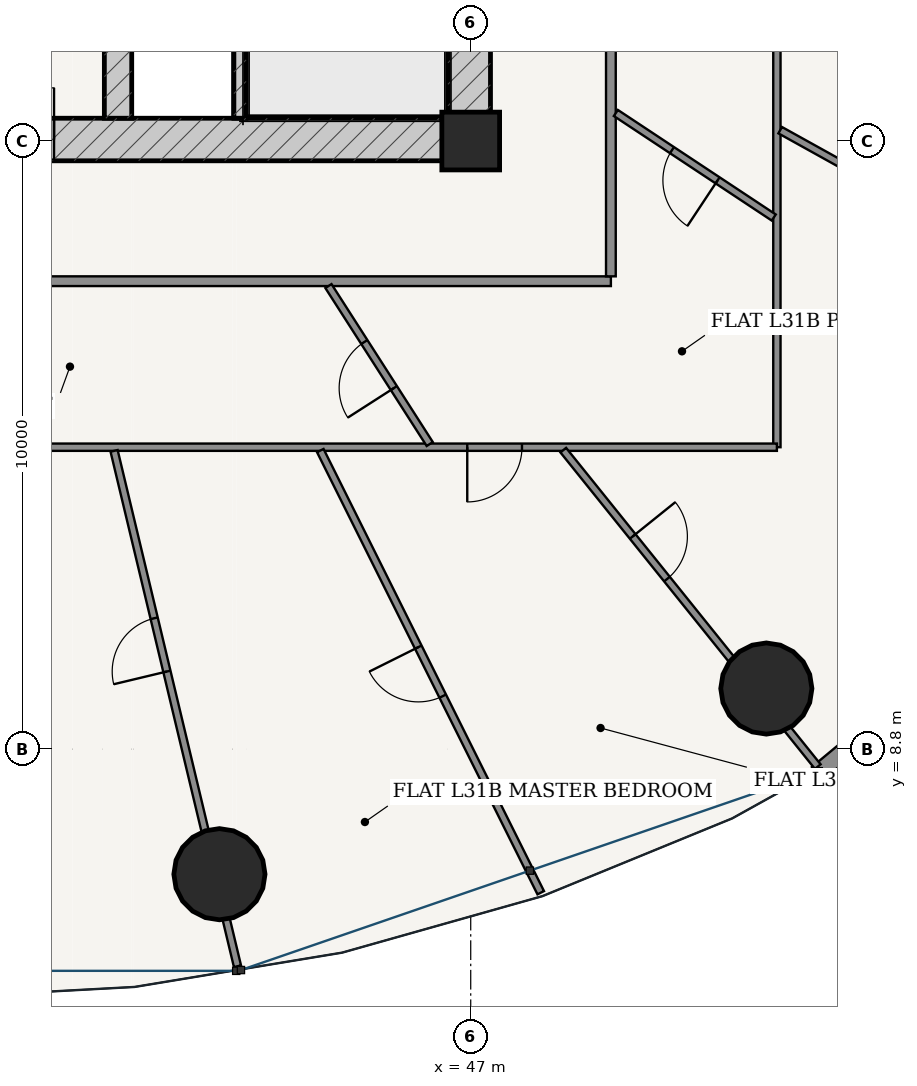
"""IFC4 building model, lengths in metres.
Left out: names, types, materials, properties, quantities, classifications, styles, units other than length and angle.
Written with IfcOpenShell. Run it as: python <this file> out.ifc"""

import sys

from ifc_helpers import new_model, si_unit, direction, frame, frame_2d, origin, origin_2d, place, context, subcontext, project, spatial, rectangle, hollow_circle, extrude, source, transform, mapped, element, fill, save


model = new_model("IFC4")
c1 = context("Model", 3, precision=1e-05, world=origin(), true_north=direction((-0.2419218956, 0.970295726276)))
c2 = subcontext(c1, "Body", "Model", "MODEL_VIEW")
j1 = project(units=[si_unit("LENGTHUNIT", "METRE"), si_unit("PLANEANGLEUNIT", "RADIAN")], contexts=[c1])
p1 = place(None, origin())
s1 = spatial("IfcSite", under=j1, at=p1, CompositionType="ELEMENT")
p2 = place(p1, origin())
s2 = spatial("IfcBuilding", under=s1, at=p2, CompositionType="ELEMENT")
p3 = place(p2, frame((0.0, 0.0, 119.4)))
s3 = spatial("IfcBuildingStorey", under=s2, at=p3, CompositionType="ELEMENT", Elevation=119.4)
p4 = place(p3, frame((47.0, 18.8, 0.0), z_axis=(0.0, 0.0, 1.0), x_axis=(1.0, 0.0, 0.0)))
e1 = element("IfcColumn", 1, at=p4, inside=s3, PredefinedType="COLUMN", context=c2, shape_type="SweptSolid", body=[
    extrude(rectangle(XDim=0.95, YDim=0.95, at=origin_2d()), origin(), (0.0, 0.0, 1.0), 3.6),
])
p5 = place(p3, frame((28.675, 18.825, 0.0), z_axis=(0.0, 0.0, 1.0), x_axis=(1.0, 0.0, 0.0)))
e2 = element("IfcWall", 2, at=p5, inside=s3, PredefinedType="SHEAR", context=c2, shape_type="SweptSolid", body=[
    extrude(rectangle(XDim=18.65, YDim=0.7, at=frame_2d((9.325, 0.0))), origin(), (0.0, 0.0, 1.0), 3.325),
])
p6 = place(p5, frame((7.577, 0.0, 0.0)))
e3 = element("IfcOpeningElement", 3, at=p6, cuts=e2, PredefinedType="OPENING", context=c2, shape_type="SweptSolid", body=[
    extrude(rectangle(XDim=0.85, YDim=2.1, at=frame_2d((0.425, 1.05))), frame((0.0, 0.36, 0.0), z_axis=(0.0, -1.0, 0.0), x_axis=(1.0, 0.0, 0.0)), (0.0, 0.0, 1.0), 0.72),
])
p7 = place(p5, frame((10.623, 0.0, 0.0)))
e4 = element("IfcOpeningElement", 4, at=p7, cuts=e2, PredefinedType="OPENING", context=c2, shape_type="SweptSolid", body=[
    extrude(rectangle(XDim=0.85, YDim=2.1, at=frame_2d((0.425, 1.05))), frame((0.0, 0.36, 0.0), z_axis=(0.0, -1.0, 0.0), x_axis=(1.0, 0.0, 0.0)), (0.0, 0.0, 1.0), 0.72),
])
p8 = place(p3, frame((46.975, 19.175, 0.0), z_axis=(0.0, 0.0, 1.0), x_axis=(0.0, 1.0, 0.0)))
e5 = element("IfcWall", 5, at=p8, inside=s3, PredefinedType="SHEAR", context=c2, shape_type="SweptSolid", body=[
    extrude(rectangle(XDim=15.25, YDim=0.7, at=frame_2d((7.625, 0.0))), origin(), (0.0, 0.0, 1.0), 3.325),
])
p9 = place(p8, frame((9.875, 0.0, 0.0)))
e6 = element("IfcOpeningElement", 6, at=p9, cuts=e5, PredefinedType="OPENING", context=c2, shape_type="SweptSolid", body=[
    extrude(rectangle(XDim=1.5, YDim=2.2, at=frame_2d((0.75, 1.1))), frame((0.0, 0.36, 0.0), z_axis=(0.0, -1.0, 0.0), x_axis=(1.0, 0.0, 0.0)), (0.0, 0.0, 1.0), 0.72),
])
p10 = place(p3, frame((43.205, 19.175, 0.0), z_axis=(0.0, 0.0, 1.0), x_axis=(0.0, 1.0, 0.0)))
e7 = element("IfcWall", 7, at=p10, inside=s3, PredefinedType="SOLIDWALL", context=c2, shape_type="SweptSolid", body=[
    extrude(rectangle(XDim=7.375, YDim=0.2, at=frame_2d((3.688, 0.0))), origin(), (0.0, 0.0, 1.0), 3.325),
])
p11 = place(p3, frame((41.2, 19.175, 0.0), z_axis=(0.0, 0.0, 1.0), x_axis=(0.0, 1.0, 0.0)))
e8 = element("IfcWall", 8, at=p11, inside=s3, PredefinedType="SHEAR", context=c2, shape_type="SweptSolid", body=[
    extrude(rectangle(XDim=15.25, YDim=0.45, at=frame_2d((7.625, 0.0))), origin(), (0.0, 0.0, 1.0), 3.325),
])
p12 = place(p11, frame((7.8, 0.0, 0.0)))
e9 = element("IfcOpeningElement", 9, at=p12, cuts=e8, PredefinedType="OPENING", context=c2, shape_type="SweptSolid", body=[
    extrude(rectangle(XDim=1.05, YDim=2.15, at=frame_2d((0.525, 1.075))), frame((0.0, 0.235, 0.0), z_axis=(0.0, -1.0, 0.0), x_axis=(1.0, 0.0, 0.0)), (0.0, 0.0, 1.0), 0.47),
])
for number, where, z_axis, x_axis in (
    (10, (42.867, 6.743, 0.0), (0.0, 0.0, 1.0), (1.0, 0.0, 0.0)),
    (11, (51.862, 9.796, 0.0), (0.0, 0.0, 1.0), (1.0, 0.0, 0.0)),
):
    element("IfcColumn", number, at=place(p3, frame(where, z_axis=z_axis, x_axis=x_axis)), inside=s3, PredefinedType="COLUMN", context=c2, shape_type="SweptSolid", body=[
        extrude(hollow_circle(Radius=0.75, WallThickness=0.045, at=origin_2d()), origin(), (0.0, 0.0, 1.0), 3.6),
    ])
p13 = place(p3, frame((52.7, 8.398, 0.0), z_axis=(0.0, 0.0, 1.0), x_axis=(0.769254958887, 0.638941944333, 0.0)))
e12 = element("IfcWall", 12, at=p13, inside=s3, PredefinedType="SOLIDWALL", context=c2, shape_type="SweptSolid", body=[
    extrude(rectangle(XDim=9.69, YDim=0.28, at=frame_2d((4.845, 0.0))), origin(), (0.0, 0.0, 1.0), 3.325),
])
p14 = place(p13, frame((1.566, 0.0, 0.85)))
e13 = element("IfcOpeningElement", 13, at=p14, cuts=e12, PredefinedType="OPENING", context=c2, shape_type="SweptSolid", body=[
    extrude(rectangle(XDim=2.1, YDim=1.95, at=frame_2d((1.05, 0.975))), frame((0.0, 0.15, 0.0), z_axis=(0.0, -1.0, 0.0), x_axis=(1.0, 0.0, 0.0)), (0.0, 0.0, 1.0), 0.3),
])
p15 = place(p13, frame((6.023, 0.0, 0.85)))
e14 = element("IfcOpeningElement", 14, at=p15, cuts=e12, PredefinedType="OPENING", context=c2, shape_type="SweptSolid", body=[
    extrude(rectangle(XDim=2.1, YDim=1.95, at=frame_2d((1.05, 0.975))), frame((0.0, 0.15, 0.0), z_axis=(0.0, -1.0, 0.0), x_axis=(1.0, 0.0, 0.0)), (0.0, 0.0, 1.0), 0.3),
])
p16 = place(p3, frame((26.695, 16.495, 0.0), z_axis=(0.0, 0.0, 1.0), x_axis=(1.0, 0.0, 0.0)))
e15 = element("IfcWall", 15, at=p16, inside=s3, PredefinedType="PARTITIONING", context=c2, shape_type="SweptSolid", body=[
    extrude(rectangle(XDim=22.61, YDim=0.16, at=frame_2d((11.305, 0.0))), origin(), (0.0, 0.0, 1.0), 2.767),
])
p17 = place(p3, frame((49.305, 16.575, 0.0), z_axis=(0.0, 0.0, 1.0), x_axis=(0.0, 1.0, 0.0)))
e16 = element("IfcWall", 16, at=p17, inside=s3, PredefinedType="PARTITIONING", context=c2, shape_type="SweptSolid", body=[
    extrude(rectangle(XDim=20.45, YDim=0.16, at=frame_2d((10.225, 0.0))), origin(), (0.0, 0.0, 1.0), 2.767),
])
p18 = place(p17, frame((17.046, 0.0, 0.0)))
e17 = element("IfcOpeningElement", 17, at=p18, cuts=e16, PredefinedType="OPENING", context=c2, shape_type="SweptSolid", body=[
    extrude(rectangle(XDim=0.98, YDim=2.2, at=frame_2d((0.49, 1.1))), frame((0.0, 0.09, 0.0), z_axis=(0.0, -1.0, 0.0), x_axis=(1.0, 0.0, 0.0)), (0.0, 0.0, 1.0), 0.18),
])
p19 = place(p3, frame((52.035, 39.835, 0.0), z_axis=(0.0, 0.0, 1.0), x_axis=(0.0, -1.0, 0.0)))
e18 = element("IfcWall", 18, at=p19, inside=s3, PredefinedType="PARTITIONING", context=c2, shape_type="SweptSolid", body=[
    extrude(rectangle(XDim=26.07, YDim=0.12, at=frame_2d((13.035, 0.0))), origin(), (0.0, 0.0, 1.0), 2.767),
])
p20 = place(p19, frame((3.362, 0.0, 0.0)))
e19 = element("IfcOpeningElement", 19, at=p20, cuts=e18, PredefinedType="OPENING", context=c2, shape_type="SweptSolid", body=[
    extrude(rectangle(XDim=0.9, YDim=2.15, at=frame_2d((0.45, 1.075))), frame((0.0, 0.07, 0.0), z_axis=(0.0, -1.0, 0.0), x_axis=(1.0, 0.0, 0.0)), (0.0, 0.0, 1.0), 0.14),
])
p21 = place(p19, frame((13.924, 0.0, 0.0)))
e20 = element("IfcOpeningElement", 20, at=p21, cuts=e18, PredefinedType="OPENING", context=c2, shape_type="SweptSolid", body=[
    extrude(rectangle(XDim=0.9, YDim=2.15, at=frame_2d((0.45, 1.075))), frame((0.0, 0.07, 0.0), z_axis=(0.0, -1.0, 0.0), x_axis=(1.0, 0.0, 0.0)), (0.0, 0.0, 1.0), 0.14),
])
p22 = place(p3, frame((52.035, 13.765, 0.0), z_axis=(0.0, 0.0, 1.0), x_axis=(-1.0, 0.0, 0.0)))
e21 = element("IfcWall", 21, at=p22, inside=s3, PredefinedType="PARTITIONING", context=c2, shape_type="SweptSolid", body=[
    extrude(rectangle(XDim=24.416, YDim=0.12, at=frame_2d((12.208, 0.0))), origin(), (0.0, 0.0, 1.0), 2.767),
])
p23 = place(p22, frame((4.192, 0.0, 0.0)))
e22 = element("IfcOpeningElement", 22, at=p23, cuts=e21, PredefinedType="OPENING", context=c2, shape_type="SweptSolid", body=[
    extrude(rectangle(XDim=0.9, YDim=2.15, at=frame_2d((0.45, 1.075))), frame((0.0, 0.07, 0.0), z_axis=(0.0, -1.0, 0.0), x_axis=(1.0, 0.0, 0.0)), (0.0, 0.0, 1.0), 0.14),
])
p24 = place(p22, frame((19.728, 0.0, 0.0)))
e23 = element("IfcOpeningElement", 23, at=p24, cuts=e21, PredefinedType="OPENING", context=c2, shape_type="SweptSolid", body=[
    extrude(rectangle(XDim=0.86, YDim=2.15, at=frame_2d((0.43, 1.075))), frame((0.0, 0.07, 0.0), z_axis=(0.0, -1.0, 0.0), x_axis=(1.0, 0.0, 0.0)), (0.0, 0.0, 1.0), 0.14),
])
p25 = place(p3, frame((41.135, 13.705, 0.0), z_axis=(0.0, 0.0, 1.0), x_axis=(0.23282725047, -0.97251810854, 0.0)))
e24 = element("IfcWall", 24, at=p25, inside=s3, PredefinedType="PARTITIONING", context=c2, shape_type="SweptSolid", body=[
    extrude(rectangle(XDim=8.715, YDim=0.12, at=frame_2d((4.357, 0.0))), origin(), (0.0, 0.0, 1.0), 2.767),
])
p26 = place(p25, frame((2.831, 0.0, 0.0)))
e25 = element("IfcOpeningElement", 25, at=p26, cuts=e24, PredefinedType="OPENING", context=c2, shape_type="SweptSolid", body=[
    extrude(rectangle(XDim=0.9, YDim=2.15, at=frame_2d((0.45, 1.075))), frame((0.0, 0.07, 0.0), z_axis=(0.0, -1.0, 0.0), x_axis=(1.0, 0.0, 0.0)), (0.0, 0.0, 1.0), 0.14),
])
p27 = place(p3, frame((44.526, 13.709, 0.0), z_axis=(0.0, 0.0, 1.0), x_axis=(0.446179583353, -0.894943450392, 0.0)))
e26 = element("IfcWall", 26, at=p27, inside=s3, PredefinedType="PARTITIONING", context=c2, shape_type="SweptSolid", body=[
    extrude(rectangle(XDim=8.125, YDim=0.12, at=frame_2d((4.062, 0.0))), origin(), (0.0, 0.0, 1.0), 2.767),
])
p28 = place(p27, frame((3.612, 0.0, 0.0)))
e27 = element("IfcOpeningElement", 27, at=p28, cuts=e26, PredefinedType="OPENING", context=c2, shape_type="SweptSolid", body=[
    extrude(rectangle(XDim=0.9, YDim=2.15, at=frame_2d((0.45, 1.075))), frame((0.0, 0.07, 0.0), z_axis=(0.0, -1.0, 0.0), x_axis=(1.0, 0.0, 0.0)), (0.0, 0.0, 1.0), 0.14),
])
p29 = place(p3, frame((48.522, 13.717, 0.0), z_axis=(0.0, 0.0, 1.0), x_axis=(0.626707979732, -0.77925419995, 0.0)))
e28 = element("IfcWall", 28, at=p29, inside=s3, PredefinedType="PARTITIONING", context=c2, shape_type="SweptSolid", body=[
    extrude(rectangle(XDim=6.679, YDim=0.12, at=frame_2d((3.339, 0.0))), origin(), (0.0, 0.0, 1.0), 2.767),
])
p30 = place(p29, frame((1.821, 0.0, 0.0)))
e29 = element("IfcOpeningElement", 29, at=p30, cuts=e28, PredefinedType="OPENING", context=c2, shape_type="SweptSolid", body=[
    extrude(rectangle(XDim=0.9, YDim=2.15, at=frame_2d((0.45, 1.075))), frame((0.0, 0.07, 0.0), z_axis=(0.0, -1.0, 0.0), x_axis=(1.0, 0.0, 0.0)), (0.0, 0.0, 1.0), 0.14),
])
p31 = place(p3, frame((52.089, 18.979, 0.0), z_axis=(0.0, 0.0, 1.0), x_axis=(0.874313476423, -0.485361664066, 0.0)))
e30 = element("IfcWall", 30, at=p31, inside=s3, PredefinedType="PARTITIONING", context=c2, shape_type="SweptSolid", body=[
    extrude(rectangle(XDim=9.066, YDim=0.12, at=frame_2d((4.533, 0.0))), origin(), (0.0, 0.0, 1.0), 2.767),
])
p32 = place(p3, frame((52.094, 21.95, 0.0), z_axis=(0.0, 0.0, 1.0), x_axis=(0.945573120726, -0.32540970078, 0.0)))
e31 = element("IfcWall", 31, at=p32, inside=s3, PredefinedType="PARTITIONING", context=c2, shape_type="SweptSolid", body=[
    extrude(rectangle(XDim=11.022, YDim=0.12, at=frame_2d((5.511, 0.0))), origin(), (0.0, 0.0, 1.0), 2.767),
])
p33 = place(p32, frame((5.061, 0.0, 0.0)))
e32 = element("IfcOpeningElement", 32, at=p33, cuts=e31, PredefinedType="OPENING", context=c2, shape_type="SweptSolid", body=[
    extrude(rectangle(XDim=0.9, YDim=2.15, at=frame_2d((0.45, 1.075))), frame((0.0, 0.07, 0.0), z_axis=(0.0, -1.0, 0.0), x_axis=(1.0, 0.0, 0.0)), (0.0, 0.0, 1.0), 0.14),
])
p34 = place(p3, frame((44.66, 16.415, 0.0), z_axis=(0.0, 0.0, 1.0), x_axis=(0.539825682796, -0.841776830397, 0.0)))
e33 = element("IfcWall", 33, at=p34, inside=s3, PredefinedType="PARTITIONING", context=c2, shape_type="SweptSolid", body=[
    extrude(rectangle(XDim=3.086, YDim=0.12, at=frame_2d((1.543, 0.0))), origin(), (0.0, 0.0, 1.0), 3.325),
])
p35 = place(p34, frame((1.093, 0.0, 0.0)))
e34 = element("IfcOpeningElement", 34, at=p35, cuts=e33, PredefinedType="OPENING", context=c2, shape_type="SweptSolid", body=[
    extrude(rectangle(XDim=0.9, YDim=2.15, at=frame_2d((0.45, 1.075))), frame((0.0, 0.07, 0.0), z_axis=(0.0, -1.0, 0.0), x_axis=(1.0, 0.0, 0.0)), (0.0, 0.0, 1.0), 0.14),
])
p36 = place(p3, frame((49.387, 19.261, 0.0), z_axis=(0.0, 0.0, 1.0), x_axis=(0.833806969544, -0.552056099993, 0.0)))
e35 = element("IfcWall", 35, at=p36, inside=s3, PredefinedType="PARTITIONING", context=c2, shape_type="SweptSolid", body=[
    extrude(rectangle(XDim=3.114, YDim=0.12, at=frame_2d((1.557, 0.0))), origin(), (0.0, 0.0, 1.0), 3.325),
])
p37 = place(p36, frame((1.107, 0.0, 0.0)))
e36 = element("IfcOpeningElement", 36, at=p37, cuts=e35, PredefinedType="OPENING", context=c2, shape_type="SweptSolid", body=[
    extrude(rectangle(XDim=0.9, YDim=2.15, at=frame_2d((0.45, 1.075))), frame((0.0, 0.07, 0.0), z_axis=(0.0, -1.0, 0.0), x_axis=(1.0, 0.0, 0.0)), (0.0, 0.0, 1.0), 0.14),
])
m1 = source(origin(), c2, "Body", "SweptSolid", [
    extrude(rectangle(XDim=0.85, YDim=2.1, at=frame_2d((0.425, 1.05))), frame((0.0, 0.025, 0.0), z_axis=(0.0, -1.0, 0.0), x_axis=(1.0, 0.0, 0.0)), (0.0, 0.0, 1.0), 0.05),
])
p38 = place(p7, origin())
e37 = element("IfcDoor", 37, at=p38, inside=s3, OperationType="SINGLE_SWING_RIGHT", PredefinedType="DOOR", context=c2, shape_type="MappedRepresentation", body=[
    mapped(m1, transform((0.0, 0.0, 0.0), scale=1.0)),
])
fill(e4, e37)
m2 = source(origin(), c2, "Body", "SweptSolid", [
    extrude(rectangle(XDim=0.9, YDim=2.15, at=frame_2d((0.45, 1.075))), frame((0.0, 0.025, 0.0), z_axis=(0.0, -1.0, 0.0), x_axis=(1.0, 0.0, 0.0)), (0.0, 0.0, 1.0), 0.05),
])
p39 = place(p37, frame((0.9, 0.0, 0.0), z_axis=(0.0, 0.0, 1.0), x_axis=(-1.0, 0.0, 0.0)))
e38 = element("IfcDoor", 38, at=p39, inside=s3, OperationType="SINGLE_SWING_LEFT", PredefinedType="DOOR", context=c2, shape_type="MappedRepresentation", body=[
    mapped(m2, transform((0.0, 0.0, 0.0), scale=1.0)),
])
fill(e36, e38)
p40 = place(p23, origin())
e39 = element("IfcDoor", 39, at=p40, inside=s3, OperationType="SINGLE_SWING_RIGHT", PredefinedType="DOOR", context=c2, shape_type="MappedRepresentation", body=[
    mapped(m2, transform((0.0, 0.0, 0.0), scale=1.0)),
])
fill(e22, e39)
p41 = place(p30, origin())
e40 = element("IfcDoor", 40, at=p41, inside=s3, OperationType="SINGLE_SWING_LEFT", PredefinedType="DOOR", context=c2, shape_type="MappedRepresentation", body=[
    mapped(m2, transform((0.0, 0.0, 0.0), scale=1.0)),
])
fill(e29, e40)
p42 = place(p35, frame((0.9, 0.0, 0.0), z_axis=(0.0, 0.0, 1.0), x_axis=(-1.0, 0.0, 0.0)))
e41 = element("IfcDoor", 41, at=p42, inside=s3, OperationType="SINGLE_SWING_LEFT", PredefinedType="DOOR", context=c2, shape_type="MappedRepresentation", body=[
    mapped(m2, transform((0.0, 0.0, 0.0), scale=1.0)),
])
fill(e34, e41)
p43 = place(p28, frame((0.9, 0.0, 0.0), z_axis=(0.0, 0.0, 1.0), x_axis=(-1.0, 0.0, 0.0)))
e42 = element("IfcDoor", 42, at=p43, inside=s3, OperationType="SINGLE_SWING_RIGHT", PredefinedType="DOOR", context=c2, shape_type="MappedRepresentation", body=[
    mapped(m2, transform((0.0, 0.0, 0.0), scale=1.0)),
])
fill(e27, e42)
p44 = place(p26, frame((0.9, 0.0, 0.0), z_axis=(0.0, 0.0, 1.0), x_axis=(-1.0, 0.0, 0.0)))
e43 = element("IfcDoor", 43, at=p44, inside=s3, OperationType="SINGLE_SWING_LEFT", PredefinedType="DOOR", context=c2, shape_type="MappedRepresentation", body=[
    mapped(m2, transform((0.0, 0.0, 0.0), scale=1.0)),
])
fill(e25, e43)
save(model, sys.argv[1])
